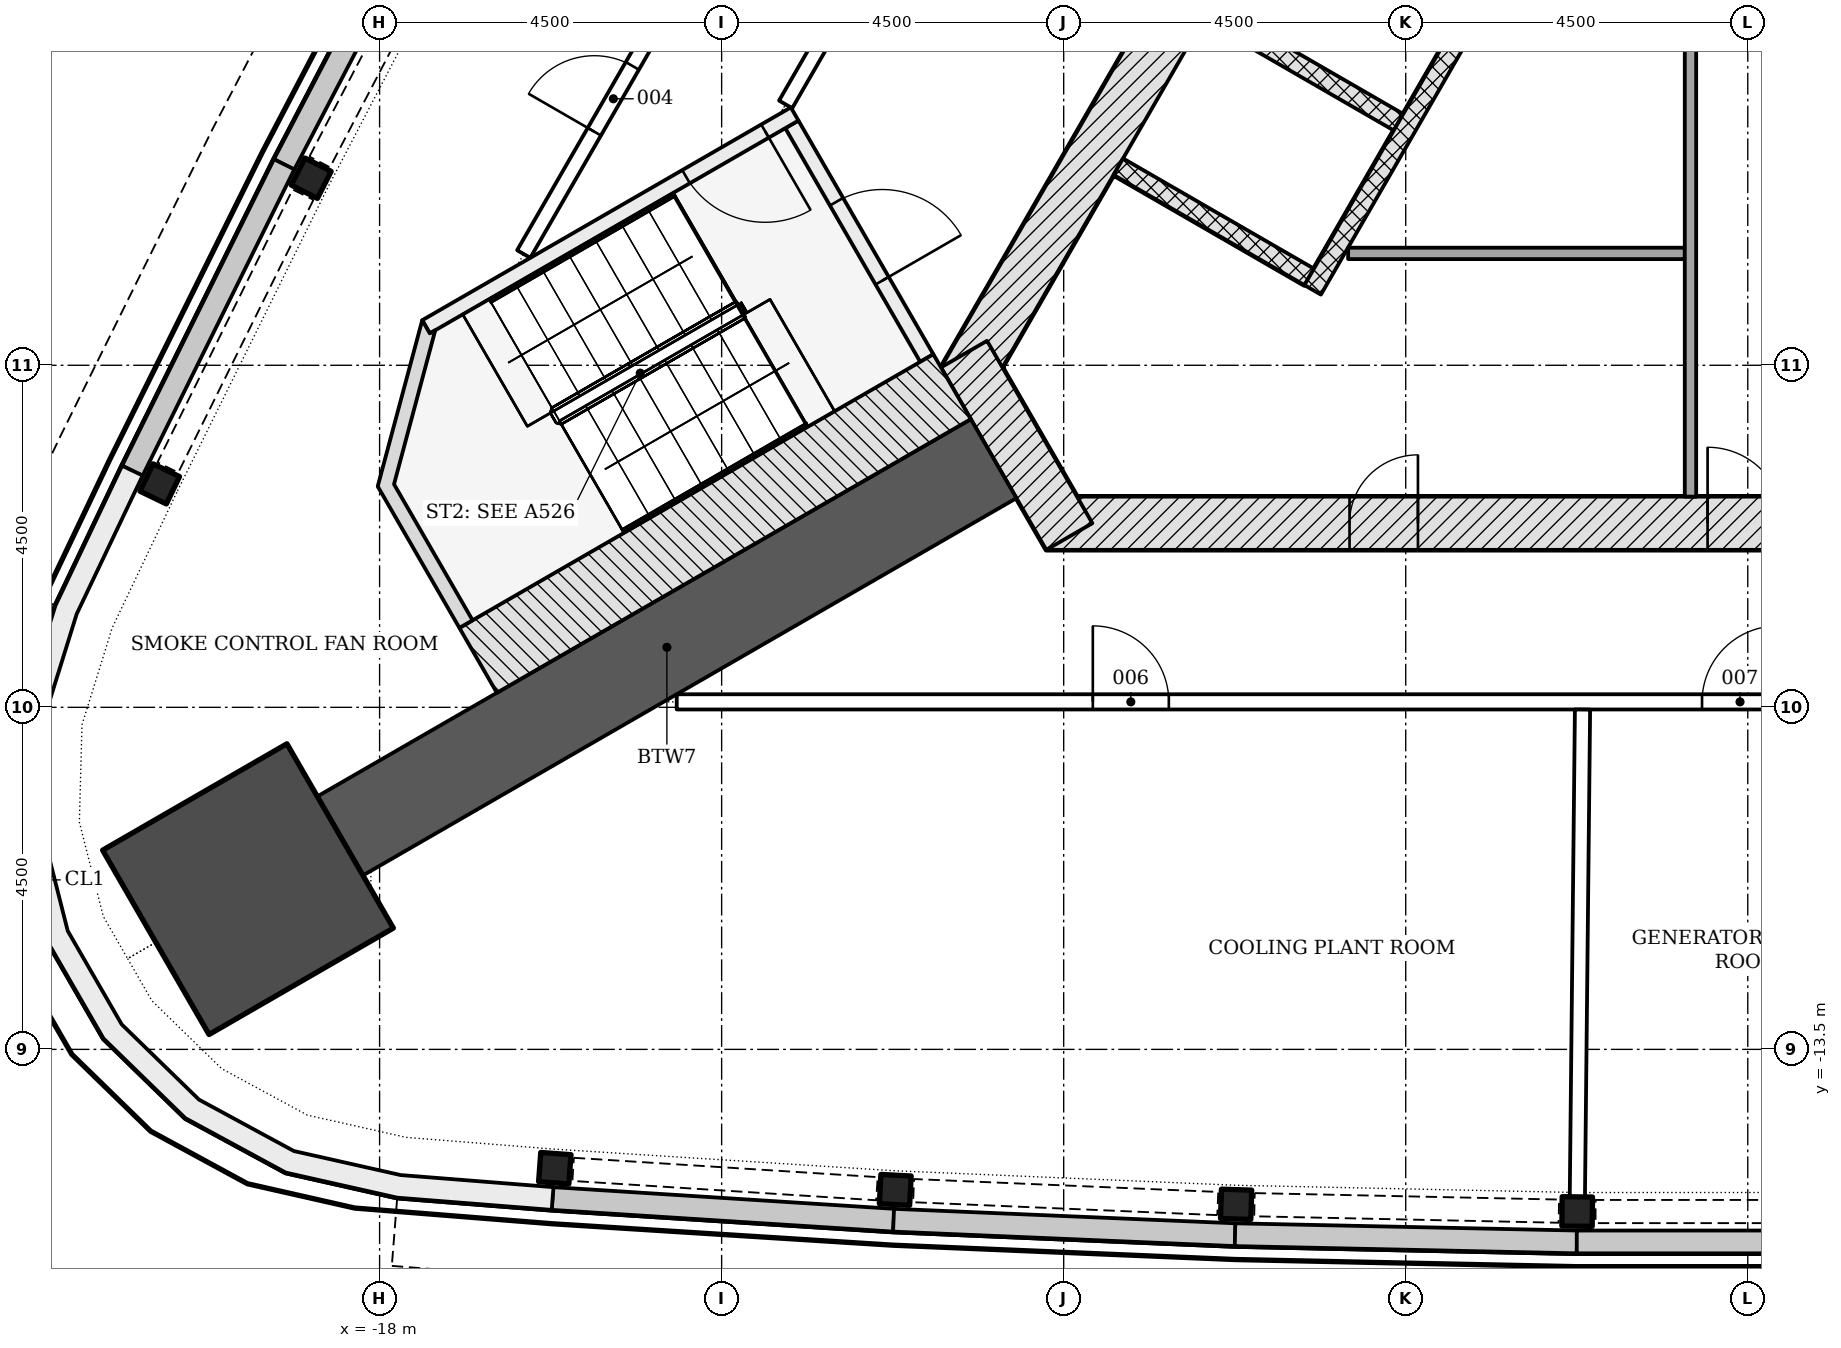
"""IFC4 building model, lengths in metres.
Left out: names, types, materials, properties, quantities, classifications, styles, units other than length and angle.
Written with IfcOpenShell. Run it as: python <this file> out.ifc"""

import sys

from ifc_helpers import new_model, si_unit, direction, frame, frame_2d, origin, origin_2d, place, context, subcontext, project, spatial, polyline, rectangle, i_section, outline, extrude, element, fill, save


model = new_model("IFC4")
c1 = context("Model", 3, precision=1e-05, world=origin(), true_north=direction((0.0, 1.0)))
c2 = subcontext(c1, "Body", "Model", "MODEL_VIEW")
j1 = project(units=[si_unit("LENGTHUNIT", "METRE"), si_unit("PLANEANGLEUNIT", "RADIAN")], contexts=[c1])
p1 = place(None, origin())
s1 = spatial("IfcSite", under=j1, at=p1, CompositionType="ELEMENT")
p2 = place(p1, origin())
s2 = spatial("IfcBuilding", under=s1, at=p2, CompositionType="ELEMENT")
p3 = place(p2, frame((0.0, 0.0, 168.9)))
s3 = spatial("IfcBuildingStorey", under=s2, at=p3, CompositionType="ELEMENT", Elevation=168.9)
p4 = place(p3, frame((-9.229, -6.578, -0.3), z_axis=(0.0, 0.0, 1.0), x_axis=(1.0, 0.0, 0.0)))
e1 = element("IfcWall", 1, at=p4, inside=s3, PredefinedType="SHEAR", context=c2, shape_type="SweptSolid", body=[
    extrude(rectangle(XDim=18.458, YDim=0.7, at=frame_2d((9.229, 0.0))), origin(), (0.0, 0.0, 1.0), 5.5),
])
p5 = place(p4, frame((8.7, 0.0, 0.3)))
e2 = element("IfcOpeningElement", 2, at=p5, cuts=e1, PredefinedType="OPENING", context=c2, shape_type="SweptSolid", body=[
    extrude(rectangle(XDim=1.0, YDim=2.1, at=frame_2d((0.5, 1.05))), frame((0.0, 0.36, 0.0), z_axis=(0.0, -1.0, 0.0), x_axis=(1.0, 0.0, 0.0)), (0.0, 0.0, 1.0), 0.72),
])
p6 = place(p4, frame((3.99, 0.0, 0.3)))
e3 = element("IfcOpeningElement", 3, at=p6, cuts=e1, PredefinedType="OPENING", context=c2, shape_type="SweptSolid", body=[
    extrude(rectangle(XDim=0.9, YDim=2.1, at=frame_2d((0.45, 1.05))), frame((0.0, 0.36, 0.0), z_axis=(0.0, -1.0, 0.0), x_axis=(1.0, 0.0, 0.0)), (0.0, 0.0, 1.0), 0.72),
])
p7 = place(p4, frame((13.539, 0.0, 0.3)))
e4 = element("IfcOpeningElement", 4, at=p7, cuts=e1, PredefinedType="OPENING", context=c2, shape_type="SweptSolid", body=[
    extrude(rectangle(XDim=0.9, YDim=2.1, at=frame_2d((0.45, 1.05))), frame((0.0, 0.36, 0.0), z_axis=(0.0, -1.0, 0.0), x_axis=(1.0, 0.0, 0.0)), (0.0, 0.0, 1.0), 0.72),
])
p8 = place(p3, frame((-1.083, 11.281, -0.3), z_axis=(0.0, 0.0, 1.0), x_axis=(-0.500001446645, -0.866024568562, 0.0)))
e5 = element("IfcWall", 5, at=p8, inside=s3, PredefinedType="SHEAR", context=c2, shape_type="SweptSolid", body=[
    extrude(rectangle(XDim=18.458, YDim=0.7, at=frame_2d((9.229, 0.0))), origin(), (0.0, 0.0, 1.0), 5.5),
])
p9 = place(p8, frame((8.979, 0.0, 0.3)))
e6 = element("IfcOpeningElement", 6, at=p9, cuts=e5, PredefinedType="OPENING", context=c2, shape_type="SweptSolid", body=[
    extrude(rectangle(XDim=1.2, YDim=2.1, at=frame_2d((0.6, 1.05))), frame((0.0, 0.36, 0.0), z_axis=(0.0, -1.0, 0.0), x_axis=(1.0, 0.0, 0.0)), (0.0, 0.0, 1.0), 0.72),
])
p10 = place(p8, frame((11.029, 0.0, 0.3)))
e7 = element("IfcOpeningElement", 7, at=p10, cuts=e5, PredefinedType="OPENING", context=c2, shape_type="SweptSolid", body=[
    extrude(rectangle(XDim=1.2, YDim=2.1, at=frame_2d((0.6, 1.05))), frame((0.0, 0.36, 0.0), z_axis=(0.0, -1.0, 0.0), x_axis=(1.0, 0.0, 0.0)), (0.0, 0.0, 1.0), 0.72),
])
p11 = place(p3, frame((-10.311, -4.353, -0.3), z_axis=(0.0, 0.0, 1.0), x_axis=(0.500042739161, -0.866000726912, 0.0)))
e8 = element("IfcWall", 8, at=p11, inside=s3, PredefinedType="SHEAR", context=c2, shape_type="SweptSolid", body=[
    extrude(rectangle(XDim=2.771, YDim=0.7, at=frame_2d((1.386, 0.0))), origin(), (0.0, 0.0, 1.0), 5.5),
])
p12 = place(p3, frame((-9.922, -5.728, -0.3), z_axis=(0.0, 0.0, 1.0), x_axis=(-0.866029553954, -0.499992811627, 0.0)))
e9 = element("IfcWall", 9, at=p12, inside=s3, PredefinedType="SHEAR", context=c2, shape_type="SweptSolid", body=[
    extrude(rectangle(XDim=9.927, YDim=1.2, at=frame_2d((4.964, 0.0))), origin(), (0.0, 0.0, 1.0), 5.5),
])
p13 = place(p3, frame((-19.731, -11.392, -0.3), z_axis=(0.0, 0.0, 1.0), x_axis=(-0.866025403784, -0.5, 0.0)))
e10 = element("IfcColumn", 10, at=p13, inside=s3, PredefinedType="COLUMN", context=c2, shape_type="SweptSolid", body=[
    extrude(rectangle(XDim=2.8, YDim=2.8, at=origin_2d()), origin(), (0.0, 0.0, 1.0), 5.5),
])
for number, where, z_axis, x_axis in (
    (11, (-18.9, -2.039, -0.3), (0.0, 0.0, 1.0), (-0.453, -0.891, 0.0)),
    (12, (-20.893, -6.061, -0.3), (0.0, 0.0, 1.0), (-0.434, -0.901, 0.0)),
    (13, (-15.695, -15.063, -0.3), (0.0, 0.0, 1.0), (0.997, -0.074, 0.0)),
    (14, (-11.216, -15.348, -0.3), (0.0, 0.0, 1.0), (0.999, -0.053, 0.0)),
    (15, (-6.731, -15.538, -0.3), (0.0, 0.0, 1.0), (0.999, -0.032, 0.0)),
    (16, (-2.244, -15.633, -0.3), (0.0, 0.0, 1.0), (1.0, -0.011, 0.0)),
):
    element("IfcColumn", number, at=place(p3, frame(where, z_axis=z_axis, x_axis=x_axis)), inside=s3, PredefinedType="COLUMN", context=c2, shape_type="SweptSolid", body=[
        extrude(i_section(OverallWidth=0.399, OverallDepth=0.386, WebThickness=0.021, FlangeThickness=0.033, FilletRadius=0.015, at=origin_2d()), origin(), (0.0, 0.0, 1.0), 5.5),
    ])
p14 = place(p3, origin())
e17 = element("IfcWall", 17, at=p14, inside=s3, PredefinedType="NOTDEFINED", context=c2, shape_type="SweptSolid", body=[
    extrude(outline(polyline([(-17.307, 2.199), (-19.39, -1.79), (-19.124, -1.928), (-17.041, 2.061), (-17.307, 2.199)])), origin(), (0.0, 0.0, 1.0), 1.2),
])
p15 = place(p3, origin())
e18 = element("IfcWall", 18, at=p15, inside=s3, PredefinedType="NOTDEFINED", context=c2, shape_type="SweptSolid", body=[
    extrude(outline(polyline([(-19.39, -1.79), (-21.388, -5.822), (-21.119, -5.955), (-19.121, -1.923), (-19.39, -1.79)])), origin(), (0.0, 0.0, 1.0), 1.2),
])
p16 = place(p3, origin())
e19 = element("IfcWall", 19, at=p16, inside=s3, PredefinedType="NOTDEFINED", context=c2, shape_type="SweptSolid", body=[
    extrude(outline(polyline([(-15.736, -15.612), (-11.245, -15.897), (-11.226, -15.598), (-15.717, -15.312), (-15.736, -15.612)])), origin(), (0.0, 0.0, 1.0), 1.2),
])
p17 = place(p3, origin())
e20 = element("IfcWall", 20, at=p17, inside=s3, PredefinedType="NOTDEFINED", context=c2, shape_type="SweptSolid", body=[
    extrude(outline(polyline([(-11.245, -15.897), (-6.749, -16.088), (-6.736, -15.788), (-11.232, -15.598), (-11.245, -15.897)])), origin(), (0.0, 0.0, 1.0), 1.2),
])
p18 = place(p3, origin())
e21 = element("IfcWall", 21, at=p18, inside=s3, PredefinedType="NOTDEFINED", context=c2, shape_type="SweptSolid", body=[
    extrude(outline(polyline([(-6.749, -16.088), (-2.25, -16.183), (-2.244, -15.883), (-6.742, -15.788), (-6.749, -16.088)])), origin(), (0.0, 0.0, 1.0), 1.2),
])
p19 = place(p3, origin())
e22 = element("IfcWall", 22, at=p19, inside=s3, PredefinedType="NOTDEFINED", context=c2, shape_type="SweptSolid", body=[
    extrude(outline(polyline([(-2.25, -16.183), (2.25, -16.183), (2.25, -15.883), (-2.25, -15.883), (-2.25, -16.183)])), origin(), (0.0, 0.0, 1.0), 1.2),
])
p20 = place(p3, origin())
e23 = element("IfcWall", 23, at=p20, inside=s3, PredefinedType="NOTDEFINED", context=c2, shape_type="SweptSolid", body=[
    extrude(outline(polyline([(-21.388, -5.822), (-22.265, -7.662), (-22.712, -9.097), (-22.753, -10.599), (-22.383, -12.055), (-21.632, -13.357), (-20.555, -14.405), (-19.234, -15.121), (-17.768, -15.451), (-15.736, -15.612), (-15.712, -15.312), (-17.723, -15.154), (-19.128, -14.837), (-20.376, -14.161), (-21.393, -13.171), (-22.103, -11.941), (-22.452, -10.565), (-22.413, -9.146), (-21.985, -7.772), (-21.117, -5.951), (-21.388, -5.822)])), origin(), (0.0, 0.0, 1.0), 5.2),
])
for number, where, z_axis, x_axis in (
    (24, (-7.106, 0.148, -0.3), (0.0, 0.0, 1.0), (0.866, -0.5, 0.0)),
    (25, (-8.281, -1.887, -0.3), (0.0, 0.0, 1.0), (0.866, -0.5, 0.0)),
):
    element("IfcWall", number, at=place(p3, frame(where, z_axis=z_axis, x_axis=x_axis)), inside=s3, PredefinedType="PARTITIONING", context=c2, shape_type="SweptSolid", body=[
        extrude(rectangle(XDim=2.9, YDim=0.25, at=frame_2d((1.45, 0.0))), origin(), (0.0, 0.0, 1.0), 5.5),
    ])
p21 = place(p3, frame((-2.374, 2.294, 0.0), z_axis=(0.0, 0.0, 1.0), x_axis=(-0.500003174267, -0.866023571113, 0.0)))
e26 = element("IfcWall", 26, at=p21, inside=s3, PredefinedType="PARTITIONING", context=c2, shape_type="SweptSolid", body=[
    extrude(rectangle(XDim=6.7, YDim=0.25, at=frame_2d((3.35, 0.0))), origin(), (0.0, 0.0, 1.0), 5.2),
])
p22 = place(p3, frame((-5.258, -3.028, 0.0), z_axis=(0.0, 0.0, 1.0), x_axis=(1.0, 0.0, 0.0)))
e27 = element("IfcWall", 27, at=p22, inside=s3, PredefinedType="PARTITIONING", context=c2, shape_type="SweptSolid", body=[
    extrude(rectangle(XDim=4.429, YDim=0.15, at=frame_2d((2.215, 0.0))), origin(), (0.0, 0.0, 1.0), 5.2),
])
p23 = place(p3, frame((-0.754, 5.272, 0.0), z_axis=(0.0, 0.0, 1.0), x_axis=(0.0, -1.0, 0.0)))
e28 = element("IfcWall", 28, at=p23, inside=s3, PredefinedType="PARTITIONING", context=c2, shape_type="SweptSolid", body=[
    extrude(rectangle(XDim=11.5, YDim=0.15, at=frame_2d((5.75, 0.0))), origin(), (0.0, 0.0, 1.0), 5.2),
])
p24 = place(p23, frame((3.701, 0.0, 0.0)))
e29 = element("IfcOpeningElement", 29, at=p24, cuts=e28, PredefinedType="OPENING", context=c2, shape_type="SweptSolid", body=[
    extrude(rectangle(XDim=0.9, YDim=2.1, at=frame_2d((0.45, 1.05))), frame((0.0, 0.085, 0.0), z_axis=(0.0, -1.0, 0.0), x_axis=(1.0, 0.0, 0.0)), (0.0, 0.0, 1.0), 0.17),
])
p25 = place(p3, frame((-12.576, -1.331, -0.3), z_axis=(0.0, 0.0, 1.0), x_axis=(0.499970499736, -0.8660424351, 0.0)))
e30 = element("IfcWall", 30, at=p25, inside=s3, PredefinedType="SHEAR", context=c2, shape_type="SweptSolid", body=[
    extrude(rectangle(XDim=3.55, YDim=0.2, at=frame_2d((1.775, 0.0))), origin(), (0.0, 0.0, 1.0), 5.5),
])
p26 = place(p25, frame((1.175, 0.0, 0.3)))
e31 = element("IfcOpeningElement", 31, at=p26, cuts=e30, PredefinedType="OPENING", context=c2, shape_type="SweptSolid", body=[
    extrude(rectangle(XDim=1.2, YDim=2.1, at=frame_2d((0.6, 1.05))), frame((0.0, 0.11, 0.0), z_axis=(0.0, -1.0, 0.0), x_axis=(1.0, 0.0, 0.0)), (0.0, 0.0, 1.0), 0.22),
])
p27 = place(p3, frame((-12.539, -1.194, -0.3), z_axis=(0.0, 0.0, 1.0), x_axis=(-0.866045472092, -0.499965239061, 0.0)))
e32 = element("IfcWall", 32, at=p27, inside=s3, PredefinedType="SHEAR", context=c2, shape_type="SweptSolid", body=[
    extrude(rectangle(XDim=5.6, YDim=0.2, at=frame_2d((2.8, 0.0))), origin(), (0.0, 0.0, 1.0), 5.5),
])
p28 = place(p27, frame((0.45, 0.0, 0.3)))
e33 = element("IfcOpeningElement", 33, at=p28, cuts=e32, PredefinedType="OPENING", context=c2, shape_type="SweptSolid", body=[
    extrude(rectangle(XDim=1.2, YDim=2.1, at=frame_2d((0.6, 1.05))), frame((0.0, 0.11, 0.0), z_axis=(0.0, -1.0, 0.0), x_axis=(1.0, 0.0, 0.0)), (0.0, 0.0, 1.0), 0.22),
])
p29 = place(p3, frame((-10.468, -4.782, -0.3), z_axis=(0.0, 0.0, 1.0), x_axis=(-0.866018442252, -0.500012057535, 0.0)))
e34 = element("IfcWall", 34, at=p29, inside=s3, PredefinedType="SHEAR", context=c2, shape_type="SweptSolid", body=[
    extrude(rectangle(XDim=7.2, YDim=0.986, at=frame_2d((3.6, 0.0))), origin(), (0.0, 0.0, 1.0), 5.5),
])
p30 = place(p3, frame((0.0, 0.0, -0.3)))
e35 = element("IfcWall", 35, at=p30, inside=s3, PredefinedType="SHEAR", context=c2, shape_type="SweptSolid", body=[
    extrude(outline(polyline([(-17.439, -3.907), (-18.025, -6.093), (-16.95, -7.955), (-16.777, -7.855), (-17.81, -6.065), (-17.267, -4.039), (-17.339, -4.081), (-17.339, -4.081), (-17.339, -4.081), (-17.339, -4.081), (-17.339, -4.081), (-17.339, -4.081), (-17.339, -4.081), (-17.339, -4.081), (-17.339, -4.081), (-17.339, -4.081), (-17.339, -4.081), (-17.339, -4.081), (-17.339, -4.081), (-17.339, -4.081), (-17.339, -4.081), (-17.339, -4.081), (-17.339, -4.081), (-17.439, -3.907)])), origin(), (0.0, 0.0, 1.0), 5.5),
])
p31 = place(p3, frame((-0.687, 19.667, 0.0), z_axis=(0.0, 0.0, 1.0), x_axis=(-0.500000491645, -0.866025119933, 0.0)))
e36 = element("IfcWall", 36, at=p31, inside=s3, PredefinedType="PARTITIONING", context=c2, shape_type="SweptSolid", body=[
    extrude(rectangle(XDim=23.943, YDim=0.2, at=frame_2d((11.971, 0.0))), origin(), (0.0, 0.0, 1.0), 4.647),
])
p32 = place(p31, frame((16.287, 0.0, 0.0)))
e37 = element("IfcOpeningElement", 37, at=p32, cuts=e36, PredefinedType="OPENING", context=c2, shape_type="SweptSolid", body=[
    extrude(rectangle(XDim=1.2, YDim=2.1, at=frame_2d((0.6, 1.05))), frame((0.0, 0.11, 0.0), z_axis=(0.0, -1.0, 0.0), x_axis=(1.0, 0.0, 0.0)), (0.0, 0.0, 1.0), 0.22),
])
p33 = place(p3, frame((-16.104, -3.037, 0.0), z_axis=(0.0, 0.0, 1.0), x_axis=(0.500000282061, 0.866025240936, 0.0)))
e38 = element("IfcWall", 38, at=p33, inside=s3, PredefinedType="PARTITIONING", context=c2, shape_type="SweptSolid", body=[
    extrude(rectangle(XDim=29.235, YDim=0.2, at=frame_2d((14.617, 0.0))), origin(), (0.0, 0.0, 1.0), 4.647),
])
p34 = place(p33, frame((20.65, 0.0, 0.0)))
e39 = element("IfcOpeningElement", 39, at=p34, cuts=e38, PredefinedType="OPENING", context=c2, shape_type="SweptSolid", body=[
    extrude(rectangle(XDim=1.0, YDim=2.1, at=frame_2d((0.5, 1.05))), frame((0.0, 0.11, 0.0), z_axis=(0.0, -1.0, 0.0), x_axis=(1.0, 0.0, 0.0)), (0.0, 0.0, 1.0), 0.22),
])
p35 = place(p33, frame((10.287, 0.0, 0.0)))
e40 = element("IfcOpeningElement", 40, at=p35, cuts=e38, PredefinedType="OPENING", context=c2, shape_type="SweptSolid", body=[
    extrude(rectangle(XDim=1.0, YDim=2.1, at=frame_2d((0.5, 1.05))), frame((0.0, 0.11, 0.0), z_axis=(0.0, -1.0, 0.0), x_axis=(1.0, 0.0, 0.0)), (0.0, 0.0, 1.0), 0.22),
])
p36 = place(p33, frame((5.865, 0.0, 0.0)))
e41 = element("IfcOpeningElement", 41, at=p36, cuts=e38, PredefinedType="OPENING", context=c2, shape_type="SweptSolid", body=[
    extrude(rectangle(XDim=1.0, YDim=2.1, at=frame_2d((0.5, 1.05))), frame((0.0, 0.11, 0.0), z_axis=(0.0, -1.0, 0.0), x_axis=(1.0, 0.0, 0.0)), (0.0, 0.0, 1.0), 0.22),
])
p37 = place(p33, frame((1.859, 0.0, 0.0)))
e42 = element("IfcOpeningElement", 42, at=p37, cuts=e38, PredefinedType="OPENING", context=c2, shape_type="SweptSolid", body=[
    extrude(rectangle(XDim=1.0, YDim=2.1, at=frame_2d((0.5, 1.05))), frame((0.0, 0.11, 0.0), z_axis=(0.0, -1.0, 0.0), x_axis=(1.0, 0.0, 0.0)), (0.0, 0.0, 1.0), 0.22),
])
p38 = place(p3, frame((-14.091, -8.928, 0.0), z_axis=(0.0, 0.0, 1.0), x_axis=(1.0, 0.0, 0.0)))
e43 = element("IfcWall", 43, at=p38, inside=s3, PredefinedType="PARTITIONING", context=c2, shape_type="SweptSolid", body=[
    extrude(rectangle(XDim=18.991, YDim=0.2, at=frame_2d((9.495, 0.0))), origin(), (0.0, 0.0, 1.0), 4.647),
])
p39 = place(p38, frame((5.474, 0.0, 0.0)))
e44 = element("IfcOpeningElement", 44, at=p39, cuts=e43, PredefinedType="OPENING", context=c2, shape_type="SweptSolid", body=[
    extrude(rectangle(XDim=1.0, YDim=2.1, at=frame_2d((0.5, 1.05))), frame((0.0, 0.11, 0.0), z_axis=(0.0, -1.0, 0.0), x_axis=(1.0, 0.0, 0.0)), (0.0, 0.0, 1.0), 0.22),
])
p40 = place(p38, frame((13.489, 0.0, 0.0)))
e45 = element("IfcOpeningElement", 45, at=p40, cuts=e43, PredefinedType="OPENING", context=c2, shape_type="SweptSolid", body=[
    extrude(rectangle(XDim=1.0, YDim=2.1, at=frame_2d((0.5, 1.05))), frame((0.0, 0.11, 0.0), z_axis=(0.0, -1.0, 0.0), x_axis=(1.0, 0.0, 0.0)), (0.0, 0.0, 1.0), 0.22),
])
p41 = place(p38, frame((17.018, 0.0, 0.0)))
e46 = element("IfcOpeningElement", 46, at=p41, cuts=e43, PredefinedType="OPENING", context=c2, shape_type="SweptSolid", body=[
    extrude(rectangle(XDim=1.0, YDim=2.1, at=frame_2d((0.5, 1.05))), frame((0.0, 0.11, 0.0), z_axis=(0.0, -1.0, 0.0), x_axis=(1.0, 0.0, 0.0)), (0.0, 0.0, 1.0), 0.22),
])
p42 = place(p3, frame((-2.242, -15.483, 0.0), z_axis=(0.0, 0.0, 1.0), x_axis=(0.010553202581, 0.999944313407, 0.0)))
e47 = element("IfcWall", 47, at=p42, inside=s3, PredefinedType="PARTITIONING", context=c2, shape_type="SweptSolid", body=[
    extrude(rectangle(XDim=6.454, YDim=0.2, at=frame_2d((3.227, 0.0))), origin(), (0.0, 0.0, 1.0), 4.647),
])
p43 = place(p5, origin())
e48 = element("IfcDoor", 48, at=p43, inside=s3, OperationType="SINGLE_SWING_LEFT", PredefinedType="DOOR", context=c2, shape_type="SweptSolid", body=[
    extrude(rectangle(XDim=1.0, YDim=2.1, at=frame_2d((0.5, 1.05))), frame((0.0, 0.075, 0.0), z_axis=(0.0, -1.0, 0.0), x_axis=(1.0, 0.0, 0.0)), (0.0, 0.0, 1.0), 0.15),
])
fill(e2, e48)
p44 = place(p6, origin())
e49 = element("IfcDoor", 49, at=p44, inside=s3, OperationType="SINGLE_SWING_RIGHT", PredefinedType="DOOR", context=c2, shape_type="SweptSolid", body=[
    extrude(rectangle(XDim=0.9, YDim=2.1, at=frame_2d((0.45, 1.05))), frame((0.0, 0.075, 0.0), z_axis=(0.0, -1.0, 0.0), x_axis=(1.0, 0.0, 0.0)), (0.0, 0.0, 1.0), 0.15),
])
fill(e3, e49)
p45 = place(p26, origin())
e50 = element("IfcDoor", 50, at=p45, inside=s3, OperationType="SINGLE_SWING_RIGHT", PredefinedType="DOOR", context=c2, shape_type="SweptSolid", body=[
    extrude(rectangle(XDim=1.2, YDim=2.1, at=frame_2d((0.6, 1.05))), frame((0.0, 0.025, 0.0), z_axis=(0.0, -1.0, 0.0), x_axis=(1.0, 0.0, 0.0)), (0.0, 0.0, 1.0), 0.05),
])
fill(e31, e50)
p46 = place(p28, origin())
e51 = element("IfcDoor", 51, at=p46, inside=s3, OperationType="SINGLE_SWING_LEFT", PredefinedType="DOOR", context=c2, shape_type="SweptSolid", body=[
    extrude(rectangle(XDim=1.2, YDim=2.1, at=frame_2d((0.6, 1.05))), frame((0.0, 0.025, 0.0), z_axis=(0.0, -1.0, 0.0), x_axis=(1.0, 0.0, 0.0)), (0.0, 0.0, 1.0), 0.05),
])
fill(e33, e51)
p47 = place(p37, origin())
e52 = element("IfcDoor", 52, at=p47, inside=s3, OperationType="SINGLE_SWING_LEFT", PredefinedType="DOOR", context=c2, shape_type="SweptSolid", body=[
    extrude(rectangle(XDim=1.0, YDim=2.1, at=frame_2d((0.5, 1.05))), frame((0.0, 0.025, 0.0), z_axis=(0.0, -1.0, 0.0), x_axis=(1.0, 0.0, 0.0)), (0.0, 0.0, 1.0), 0.05),
])
fill(e42, e52)
p48 = place(p39, origin())
e53 = element("IfcDoor", 53, at=p48, inside=s3, OperationType="SINGLE_SWING_LEFT", PredefinedType="DOOR", context=c2, shape_type="SweptSolid", body=[
    extrude(rectangle(XDim=1.0, YDim=2.1, at=frame_2d((0.5, 1.05))), frame((0.0, 0.025, 0.0), z_axis=(0.0, -1.0, 0.0), x_axis=(1.0, 0.0, 0.0)), (0.0, 0.0, 1.0), 0.05),
])
fill(e44, e53)
p49 = place(p40, origin())
e54 = element("IfcDoor", 54, at=p49, inside=s3, OperationType="SINGLE_SWING_RIGHT", PredefinedType="DOOR", context=c2, shape_type="SweptSolid", body=[
    extrude(rectangle(XDim=1.0, YDim=2.1, at=frame_2d((0.5, 1.05))), frame((0.0, 0.025, 0.0), z_axis=(0.0, -1.0, 0.0), x_axis=(1.0, 0.0, 0.0)), (0.0, 0.0, 1.0), 0.05),
])
fill(e45, e54)
save(model, sys.argv[1])
